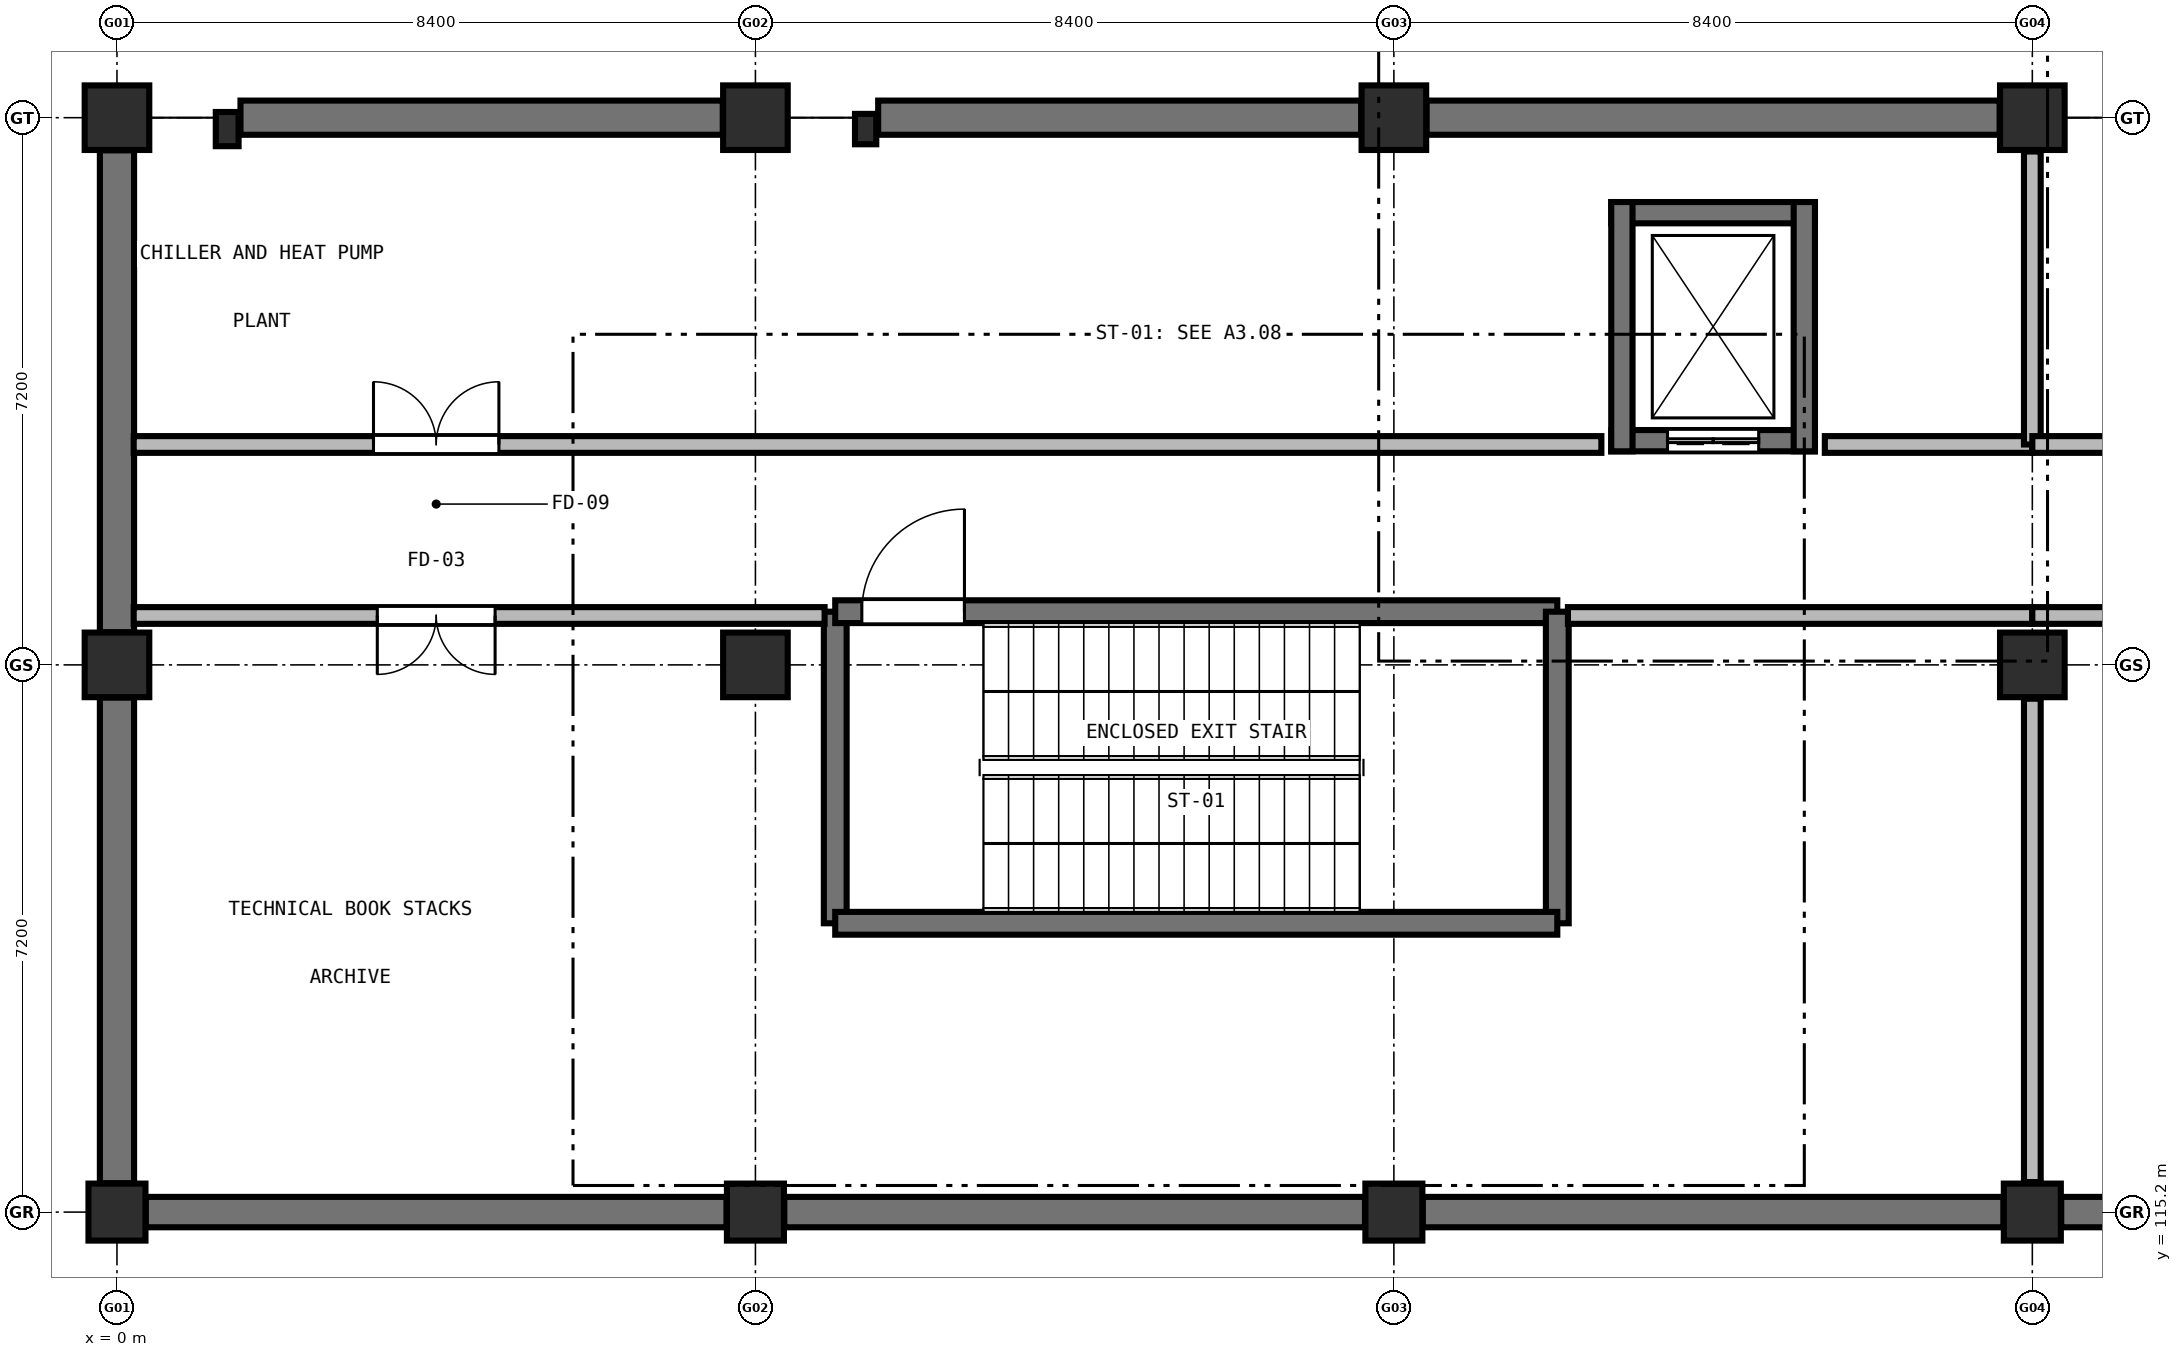
"""IFC4 building model, lengths in metres.
Left out: names, types, materials, properties, quantities, classifications, styles, units other than length and angle.
Written with IfcOpenShell. Run it as: python <this file> out.ifc"""

import sys

from ifc_helpers import new_model, si_unit, direction, frame, frame_2d, origin, origin_2d, place, context, subcontext, project, spatial, rectangle, extrude, element, fill, save


model = new_model("IFC4")
c1 = context("Model", 3, precision=1e-05, world=origin(), true_north=direction((0.0, 1.0)))
c2 = subcontext(c1, "Body", "Model", "MODEL_VIEW")
j1 = project(units=[si_unit("LENGTHUNIT", "METRE"), si_unit("PLANEANGLEUNIT", "RADIAN")], contexts=[c1])
p1 = place(None, origin())
s1 = spatial("IfcSite", under=j1, at=p1, CompositionType="ELEMENT")
p2 = place(p1, origin())
s2 = spatial("IfcBuilding", under=s1, at=p2, CompositionType="ELEMENT")
p3 = place(p2, frame((0.0, 0.0, -4.8)))
s3 = spatial("IfcBuildingStorey", under=s2, at=p3, CompositionType="ELEMENT", Elevation=-4.8)
p4 = place(p3, frame((0.0, 115.2, 0.0), z_axis=(0.0, 0.0, 1.0), x_axis=(1.0, 0.0, 0.0)))
e1 = element("IfcColumn", 1, at=p4, inside=s3, PredefinedType="COLUMN", context=c2, shape_type="SweptSolid", body=[
    extrude(rectangle(XDim=0.75, YDim=0.75, at=origin_2d()), origin(), (0.0, 0.0, 1.0), 4.8),
])
for number, where, z_axis, x_axis in (
    (2, (0.0, 122.4, 0.0), (0.0, 0.0, 1.0), (1.0, 0.0, 0.0)),
    (3, (0.0, 129.6, 0.0), (0.0, 0.0, 1.0), (1.0, 0.0, 0.0)),
):
    element("IfcColumn", number, at=place(p3, frame(where, z_axis=z_axis, x_axis=x_axis)), inside=s3, PredefinedType="COLUMN", context=c2, shape_type="SweptSolid", body=[
        extrude(rectangle(XDim=0.85, YDim=0.85, at=origin_2d()), origin(), (0.0, 0.0, 1.0), 4.8),
    ])
p5 = place(p3, frame((8.4, 115.2, 0.0), z_axis=(0.0, 0.0, 1.0), x_axis=(1.0, 0.0, 0.0)))
e4 = element("IfcColumn", 4, at=p5, inside=s3, PredefinedType="COLUMN", context=c2, shape_type="SweptSolid", body=[
    extrude(rectangle(XDim=0.75, YDim=0.75, at=origin_2d()), origin(), (0.0, 0.0, 1.0), 4.8),
])
for number, where, z_axis, x_axis in (
    (5, (8.4, 122.4, 0.0), (0.0, 0.0, 1.0), (1.0, 0.0, 0.0)),
    (6, (8.4, 129.6, 0.0), (0.0, 0.0, 1.0), (1.0, 0.0, 0.0)),
):
    element("IfcColumn", number, at=place(p3, frame(where, z_axis=z_axis, x_axis=x_axis)), inside=s3, PredefinedType="COLUMN", context=c2, shape_type="SweptSolid", body=[
        extrude(rectangle(XDim=0.85, YDim=0.85, at=origin_2d()), origin(), (0.0, 0.0, 1.0), 4.8),
    ])
p6 = place(p3, frame((16.8, 115.2, 0.0), z_axis=(0.0, 0.0, 1.0), x_axis=(1.0, 0.0, 0.0)))
e7 = element("IfcColumn", 7, at=p6, inside=s3, PredefinedType="COLUMN", context=c2, shape_type="SweptSolid", body=[
    extrude(rectangle(XDim=0.75, YDim=0.75, at=origin_2d()), origin(), (0.0, 0.0, 1.0), 4.8),
])
p7 = place(p3, frame((16.8, 129.6, 0.0), z_axis=(0.0, 0.0, 1.0), x_axis=(1.0, 0.0, 0.0)))
e8 = element("IfcColumn", 8, at=p7, inside=s3, PredefinedType="COLUMN", context=c2, shape_type="SweptSolid", body=[
    extrude(rectangle(XDim=0.85, YDim=0.85, at=origin_2d()), origin(), (0.0, 0.0, 1.0), 4.8),
])
p8 = place(p3, frame((25.2, 115.2, 0.0), z_axis=(0.0, 0.0, 1.0), x_axis=(1.0, 0.0, 0.0)))
e9 = element("IfcColumn", 9, at=p8, inside=s3, PredefinedType="COLUMN", context=c2, shape_type="SweptSolid", body=[
    extrude(rectangle(XDim=0.75, YDim=0.75, at=origin_2d()), origin(), (0.0, 0.0, 1.0), 4.8),
])
for number, where, z_axis, x_axis in (
    (10, (25.2, 122.4, 0.0), (0.0, 0.0, 1.0), (1.0, 0.0, 0.0)),
    (11, (25.2, 129.6, 0.0), (0.0, 0.0, 1.0), (1.0, 0.0, 0.0)),
):
    element("IfcColumn", number, at=place(p3, frame(where, z_axis=z_axis, x_axis=x_axis)), inside=s3, PredefinedType="COLUMN", context=c2, shape_type="SweptSolid", body=[
        extrude(rectangle(XDim=0.85, YDim=0.85, at=origin_2d()), origin(), (0.0, 0.0, 1.0), 4.8),
    ])
p9 = place(p3, frame((1.45, 129.45, 0.0), z_axis=(0.0, 0.0, 1.0), x_axis=(1.0, 0.0, 0.0)))
e12 = element("IfcColumn", 12, at=p9, inside=s3, PredefinedType="PILASTER", context=c2, shape_type="SweptSolid", body=[
    extrude(rectangle(XDim=0.3, YDim=0.45, at=origin_2d()), origin(), (0.0, 0.0, 1.0), 3.85),
])
p10 = place(p3, frame((9.85, 129.45, 0.0), z_axis=(0.0, 0.0, 1.0), x_axis=(1.0, 0.0, 0.0)))
e13 = element("IfcColumn", 13, at=p10, inside=s3, PredefinedType="PILASTER", context=c2, shape_type="SweptSolid", body=[
    extrude(rectangle(XDim=0.28, YDim=0.4, at=origin_2d()), origin(), (0.0, 0.0, 1.0), 3.85),
])
p11 = place(p3, frame((1.625, 129.6, 0.0), z_axis=(0.0, 0.0, 1.0), x_axis=(1.0, 0.0, 0.0)))
e14 = element("IfcWall", 14, at=p11, inside=s3, PredefinedType="SHEAR", context=c2, shape_type="SweptSolid", body=[
    extrude(rectangle(XDim=6.345, YDim=0.45, at=frame_2d((3.172, 0.0))), origin(), (0.0, 0.0, 1.0), 3.64),
])
p12 = place(p3, frame((10.015, 129.6, 0.0), z_axis=(0.0, 0.0, 1.0), x_axis=(1.0, 0.0, 0.0)))
e15 = element("IfcWall", 15, at=p12, inside=s3, PredefinedType="SHEAR", context=c2, shape_type="SweptSolid", body=[
    extrude(rectangle(XDim=6.355, YDim=0.45, at=frame_2d((3.178, 0.0))), origin(), (0.0, 0.0, 1.0), 3.64),
])
p13 = place(p3, frame((17.23, 129.6, 0.0), z_axis=(0.0, 0.0, 1.0), x_axis=(1.0, 0.0, 0.0)))
e16 = element("IfcWall", 16, at=p13, inside=s3, PredefinedType="SHEAR", context=c2, shape_type="SweptSolid", body=[
    extrude(rectangle(XDim=7.54, YDim=0.45, at=frame_2d((3.77, 0.0))), origin(), (0.0, 0.0, 1.0), 3.64),
])
p14 = place(p3, frame((0.0, 115.58, 0.0), z_axis=(0.0, 0.0, 1.0), x_axis=(0.0, 1.0, 0.0)))
e17 = element("IfcWall", 17, at=p14, inside=s3, PredefinedType="SHEAR", context=c2, shape_type="SweptSolid", body=[
    extrude(rectangle(XDim=6.39, YDim=0.45, at=frame_2d((3.195, 0.0))), origin(), (0.0, 0.0, 1.0), 3.64),
])
p15 = place(p3, frame((0.0, 122.83, 0.0), z_axis=(0.0, 0.0, 1.0), x_axis=(0.0, 1.0, 0.0)))
e18 = element("IfcWall", 18, at=p15, inside=s3, PredefinedType="SHEAR", context=c2, shape_type="SweptSolid", body=[
    extrude(rectangle(XDim=6.34, YDim=0.45, at=frame_2d((3.17, 0.0))), origin(), (0.0, 0.0, 1.0), 3.64),
])
p16 = place(p3, frame((0.38, 115.2, 0.0), z_axis=(0.0, 0.0, 1.0), x_axis=(1.0, 0.0, 0.0)))
e19 = element("IfcWall", 19, at=p16, inside=s3, PredefinedType="SHEAR", context=c2, shape_type="SweptSolid", body=[
    extrude(rectangle(XDim=7.64, YDim=0.4, at=frame_2d((3.82, 0.0))), origin(), (0.0, 0.0, 1.0), 3.64),
])
p17 = place(p3, frame((8.78, 115.2, 0.0), z_axis=(0.0, 0.0, 1.0), x_axis=(1.0, 0.0, 0.0)))
e20 = element("IfcWall", 20, at=p17, inside=s3, PredefinedType="SHEAR", context=c2, shape_type="SweptSolid", body=[
    extrude(rectangle(XDim=7.64, YDim=0.4, at=frame_2d((3.82, 0.0))), origin(), (0.0, 0.0, 1.0), 3.64),
])
p18 = place(p3, frame((17.18, 115.2, 0.0), z_axis=(0.0, 0.0, 1.0), x_axis=(1.0, 0.0, 0.0)))
e21 = element("IfcWall", 21, at=p18, inside=s3, PredefinedType="SHEAR", context=c2, shape_type="SweptSolid", body=[
    extrude(rectangle(XDim=7.64, YDim=0.4, at=frame_2d((3.82, 0.0))), origin(), (0.0, 0.0, 1.0), 3.64),
])
p19 = place(p3, frame((25.58, 115.2, 0.0), z_axis=(0.0, 0.0, 1.0), x_axis=(1.0, 0.0, 0.0)))
e22 = element("IfcWall", 22, at=p19, inside=s3, PredefinedType="SHEAR", context=c2, shape_type="SweptSolid", body=[
    extrude(rectangle(XDim=7.64, YDim=0.4, at=frame_2d((3.82, 0.0))), origin(), (0.0, 0.0, 1.0), 3.64),
])
p20 = place(p3, frame((9.45, 119.0, 0.0), z_axis=(0.0, 0.0, 1.0), x_axis=(0.0, 1.0, 0.0)))
e23 = element("IfcWall", 23, at=p20, inside=s3, PredefinedType="SHEAR", context=c2, shape_type="SweptSolid", body=[
    extrude(rectangle(XDim=4.1, YDim=0.3, at=frame_2d((2.05, 0.0))), origin(), (0.0, 0.0, 1.0), 4.5),
])
p21 = place(p3, frame((9.45, 123.1, 0.0), z_axis=(0.0, 0.0, 1.0), x_axis=(1.0, 0.0, 0.0)))
e24 = element("IfcWall", 24, at=p21, inside=s3, PredefinedType="SHEAR", context=c2, shape_type="SweptSolid", body=[
    extrude(rectangle(XDim=9.5, YDim=0.3, at=frame_2d((4.75, 0.0))), origin(), (0.0, 0.0, 1.0), 4.5),
])
p22 = place(p21, frame((0.35, 0.0, 0.0)))
e25 = element("IfcOpeningElement", 25, at=p22, cuts=e24, PredefinedType="OPENING", context=c2, shape_type="SweptSolid", body=[
    extrude(rectangle(XDim=1.35, YDim=2.2, at=frame_2d((0.675, 1.1))), frame((0.0, 0.16, 0.0), z_axis=(0.0, -1.0, 0.0), x_axis=(1.0, 0.0, 0.0)), (0.0, 0.0, 1.0), 0.32),
])
p23 = place(p3, frame((18.95, 123.1, 0.0), z_axis=(0.0, 0.0, 1.0), x_axis=(0.0, -1.0, 0.0)))
e26 = element("IfcWall", 26, at=p23, inside=s3, PredefinedType="SHEAR", context=c2, shape_type="SweptSolid", body=[
    extrude(rectangle(XDim=4.1, YDim=0.3, at=frame_2d((2.05, 0.0))), origin(), (0.0, 0.0, 1.0), 4.5),
])
p24 = place(p3, frame((18.95, 119.0, 0.0), z_axis=(0.0, 0.0, 1.0), x_axis=(-1.0, 0.0, 0.0)))
e27 = element("IfcWall", 27, at=p24, inside=s3, PredefinedType="SHEAR", context=c2, shape_type="SweptSolid", body=[
    extrude(rectangle(XDim=9.5, YDim=0.3, at=frame_2d((4.75, 0.0))), origin(), (0.0, 0.0, 1.0), 4.5),
])
p25 = place(p3, frame((22.34, 125.35, 0.0), z_axis=(0.0, 0.0, 1.0), x_axis=(-1.0, 0.0, 0.0)))
e28 = element("IfcWall", 28, at=p25, inside=s3, PredefinedType="SHEAR", context=c2, shape_type="SweptSolid", body=[
    extrude(rectangle(XDim=2.68, YDim=0.28, at=frame_2d((1.34, 0.0))), origin(), (0.0, 0.0, 1.0), 4.5),
])
p26 = place(p25, frame((0.74, 0.0, 0.0)))
e29 = element("IfcOpeningElement", 29, at=p26, cuts=e28, PredefinedType="OPENING", context=c2, shape_type="SweptSolid", body=[
    extrude(rectangle(XDim=1.2, YDim=2.15, at=frame_2d((0.6, 1.075))), frame((0.0, 0.15, 0.0), z_axis=(0.0, -1.0, 0.0), x_axis=(1.0, 0.0, 0.0)), (0.0, 0.0, 1.0), 0.3),
])
p27 = place(p3, frame((19.66, 128.35, 0.0), z_axis=(0.0, 0.0, 1.0), x_axis=(1.0, 0.0, 0.0)))
e30 = element("IfcWall", 30, at=p27, inside=s3, PredefinedType="SHEAR", context=c2, shape_type="SweptSolid", body=[
    extrude(rectangle(XDim=2.68, YDim=0.28, at=frame_2d((1.34, 0.0))), origin(), (0.0, 0.0, 1.0), 4.5),
])
for number, where, z_axis, x_axis in (
    (31, (19.8, 125.21, 0.0), (0.0, 0.0, 1.0), (0.0, 1.0, 0.0)),
    (32, (22.2, 128.49, 0.0), (0.0, 0.0, 1.0), (0.0, -1.0, 0.0)),
):
    element("IfcWall", number, at=place(p3, frame(where, z_axis=z_axis, x_axis=x_axis)), inside=s3, PredefinedType="SHEAR", context=c2, shape_type="SweptSolid", body=[
        extrude(rectangle(XDim=3.28, YDim=0.28, at=frame_2d((1.64, 0.0))), origin(), (0.0, 0.0, 1.0), 4.5),
    ])
p28 = place(p3, frame((0.22, 125.3, 0.0), z_axis=(0.0, 0.0, 1.0), x_axis=(1.0, 0.0, 0.0)))
e33 = element("IfcWall", 33, at=p28, inside=s3, PredefinedType="SOLIDWALL", context=c2, shape_type="SweptSolid", body=[
    extrude(rectangle(XDim=19.31, YDim=0.22, at=frame_2d((9.655, 0.0))), origin(), (0.0, 0.0, 1.0), 3.785),
])
p29 = place(p28, frame((3.155, 0.0, 0.0)))
e34 = element("IfcOpeningElement", 34, at=p29, cuts=e33, PredefinedType="OPENING", context=c2, shape_type="SweptSolid", body=[
    extrude(rectangle(XDim=1.65, YDim=2.2, at=frame_2d((0.825, 1.1))), frame((0.0, 0.12, 0.0), z_axis=(0.0, -1.0, 0.0), x_axis=(1.0, 0.0, 0.0)), (0.0, 0.0, 1.0), 0.24),
])
p30 = place(p3, frame((22.47, 125.3, 0.0), z_axis=(0.0, 0.0, 1.0), x_axis=(1.0, 0.0, 0.0)))
e35 = element("IfcWall", 35, at=p30, inside=s3, PredefinedType="SOLIDWALL", context=c2, shape_type="SweptSolid", body=[
    extrude(rectangle(XDim=2.73, YDim=0.22, at=frame_2d((1.365, 0.0))), origin(), (0.0, 0.0, 1.0), 3.785),
])
p31 = place(p3, frame((25.2, 125.3, 0.0), z_axis=(0.0, 0.0, 1.0), x_axis=(0.0, 1.0, 0.0)))
e36 = element("IfcWall", 36, at=p31, inside=s3, PredefinedType="SOLIDWALL", context=c2, shape_type="SweptSolid", body=[
    extrude(rectangle(XDim=3.855, YDim=0.22, at=frame_2d((1.927, 0.0))), origin(), (0.0, 0.0, 1.0), 3.635),
])
p32 = place(p3, frame((25.2, 125.3, 0.0), z_axis=(0.0, 0.0, 1.0), x_axis=(1.0, 0.0, 0.0)))
e37 = element("IfcWall", 37, at=p32, inside=s3, PredefinedType="SOLIDWALL", context=c2, shape_type="SweptSolid", body=[
    extrude(rectangle(XDim=25.2, YDim=0.22, at=frame_2d((12.6, 0.0))), origin(), (0.0, 0.0, 1.0), 3.785),
])
p33 = place(p32, frame((3.55, 0.0, 0.0)))
e38 = element("IfcOpeningElement", 38, at=p33, cuts=e37, PredefinedType="OPENING", context=c2, shape_type="SweptSolid", body=[
    extrude(rectangle(XDim=1.3, YDim=2.15, at=frame_2d((0.65, 1.075))), frame((0.0, 0.12, 0.0), z_axis=(0.0, -1.0, 0.0), x_axis=(1.0, 0.0, 0.0)), (0.0, 0.0, 1.0), 0.24),
])
p34 = place(p3, frame((25.2, 123.05, 0.0), z_axis=(0.0, 0.0, 1.0), x_axis=(-1.0, 0.0, 0.0)))
e39 = element("IfcWall", 39, at=p34, inside=s3, PredefinedType="SOLIDWALL", context=c2, shape_type="SweptSolid", body=[
    extrude(rectangle(XDim=6.11, YDim=0.22, at=frame_2d((3.055, 0.0))), origin(), (0.0, 0.0, 1.0), 3.785),
])
p35 = place(p3, frame((9.31, 123.05, 0.0), z_axis=(0.0, 0.0, 1.0), x_axis=(-1.0, 0.0, 0.0)))
e40 = element("IfcWall", 40, at=p35, inside=s3, PredefinedType="SOLIDWALL", context=c2, shape_type="SweptSolid", body=[
    extrude(rectangle(XDim=9.09, YDim=0.22, at=frame_2d((4.545, 0.0))), origin(), (0.0, 0.0, 1.0), 3.785),
])
p36 = place(p35, frame((4.335, 0.0, 0.0)))
e41 = element("IfcOpeningElement", 41, at=p36, cuts=e40, PredefinedType="OPENING", context=c2, shape_type="SweptSolid", body=[
    extrude(rectangle(XDim=1.55, YDim=2.2, at=frame_2d((0.775, 1.1))), frame((0.0, 0.12, 0.0), z_axis=(0.0, -1.0, 0.0), x_axis=(1.0, 0.0, 0.0)), (0.0, 0.0, 1.0), 0.24),
])
p37 = place(p3, frame((25.2, 115.595, 0.0), z_axis=(0.0, 0.0, 1.0), x_axis=(0.0, 1.0, 0.0)))
e42 = element("IfcWall", 42, at=p37, inside=s3, PredefinedType="SOLIDWALL", context=c2, shape_type="SweptSolid", body=[
    extrude(rectangle(XDim=6.36, YDim=0.22, at=frame_2d((3.18, 0.0))), origin(), (0.0, 0.0, 1.0), 3.635),
])
p38 = place(p3, frame((33.6, 123.05, 0.0), z_axis=(0.0, 0.0, 1.0), x_axis=(-1.0, 0.0, 0.0)))
e43 = element("IfcWall", 43, at=p38, inside=s3, PredefinedType="SOLIDWALL", context=c2, shape_type="SweptSolid", body=[
    extrude(rectangle(XDim=8.4, YDim=0.22, at=frame_2d((4.2, 0.0))), origin(), (0.0, 0.0, 1.0), 3.785),
])
p39 = place(p38, frame((3.6, 0.0, 0.0)))
e44 = element("IfcOpeningElement", 44, at=p39, cuts=e43, PredefinedType="OPENING", context=c2, shape_type="SweptSolid", body=[
    extrude(rectangle(XDim=1.2, YDim=2.15, at=frame_2d((0.6, 1.075))), frame((0.0, 0.12, 0.0), z_axis=(0.0, -1.0, 0.0), x_axis=(1.0, 0.0, 0.0)), (0.0, 0.0, 1.0), 0.24),
])
p40 = place(p22, origin())
e45 = element("IfcDoor", 45, at=p40, inside=s3, OperationType="SINGLE_SWING_RIGHT", PredefinedType="DOOR", context=c2, shape_type="SweptSolid", body=[
    extrude(rectangle(XDim=1.35, YDim=2.2, at=frame_2d((0.675, 1.1))), frame((0.0, 0.025, 0.0), z_axis=(0.0, -1.0, 0.0), x_axis=(1.0, 0.0, 0.0)), (0.0, 0.0, 1.0), 0.05),
])
fill(e25, e45)
p41 = place(p26, origin())
e46 = element("IfcDoor", 46, at=p41, inside=s3, OperationType="DOUBLE_DOOR_SLIDING", PredefinedType="DOOR", context=c2, shape_type="SweptSolid", body=[
    extrude(rectangle(XDim=1.2, YDim=2.15, at=frame_2d((0.6, 1.075))), frame((0.0, 0.025, 0.0), z_axis=(0.0, -1.0, 0.0), x_axis=(1.0, 0.0, 0.0)), (0.0, 0.0, 1.0), 0.05),
])
fill(e29, e46)
p42 = place(p29, origin())
e47 = element("IfcDoor", 47, at=p42, inside=s3, OperationType="DOUBLE_DOOR_SINGLE_SWING", PredefinedType="DOOR", context=c2, shape_type="SweptSolid", body=[
    extrude(rectangle(XDim=1.65, YDim=2.2, at=frame_2d((0.825, 1.1))), frame((0.0, 0.025, 0.0), z_axis=(0.0, -1.0, 0.0), x_axis=(1.0, 0.0, 0.0)), (0.0, 0.0, 1.0), 0.05),
])
fill(e34, e47)
p43 = place(p36, origin())
e48 = element("IfcDoor", 48, at=p43, inside=s3, OperationType="DOUBLE_DOOR_SINGLE_SWING", PredefinedType="DOOR", context=c2, shape_type="SweptSolid", body=[
    extrude(rectangle(XDim=1.55, YDim=2.2, at=frame_2d((0.775, 1.1))), frame((0.0, 0.025, 0.0), z_axis=(0.0, -1.0, 0.0), x_axis=(1.0, 0.0, 0.0)), (0.0, 0.0, 1.0), 0.05),
])
fill(e41, e48)
save(model, sys.argv[1])
